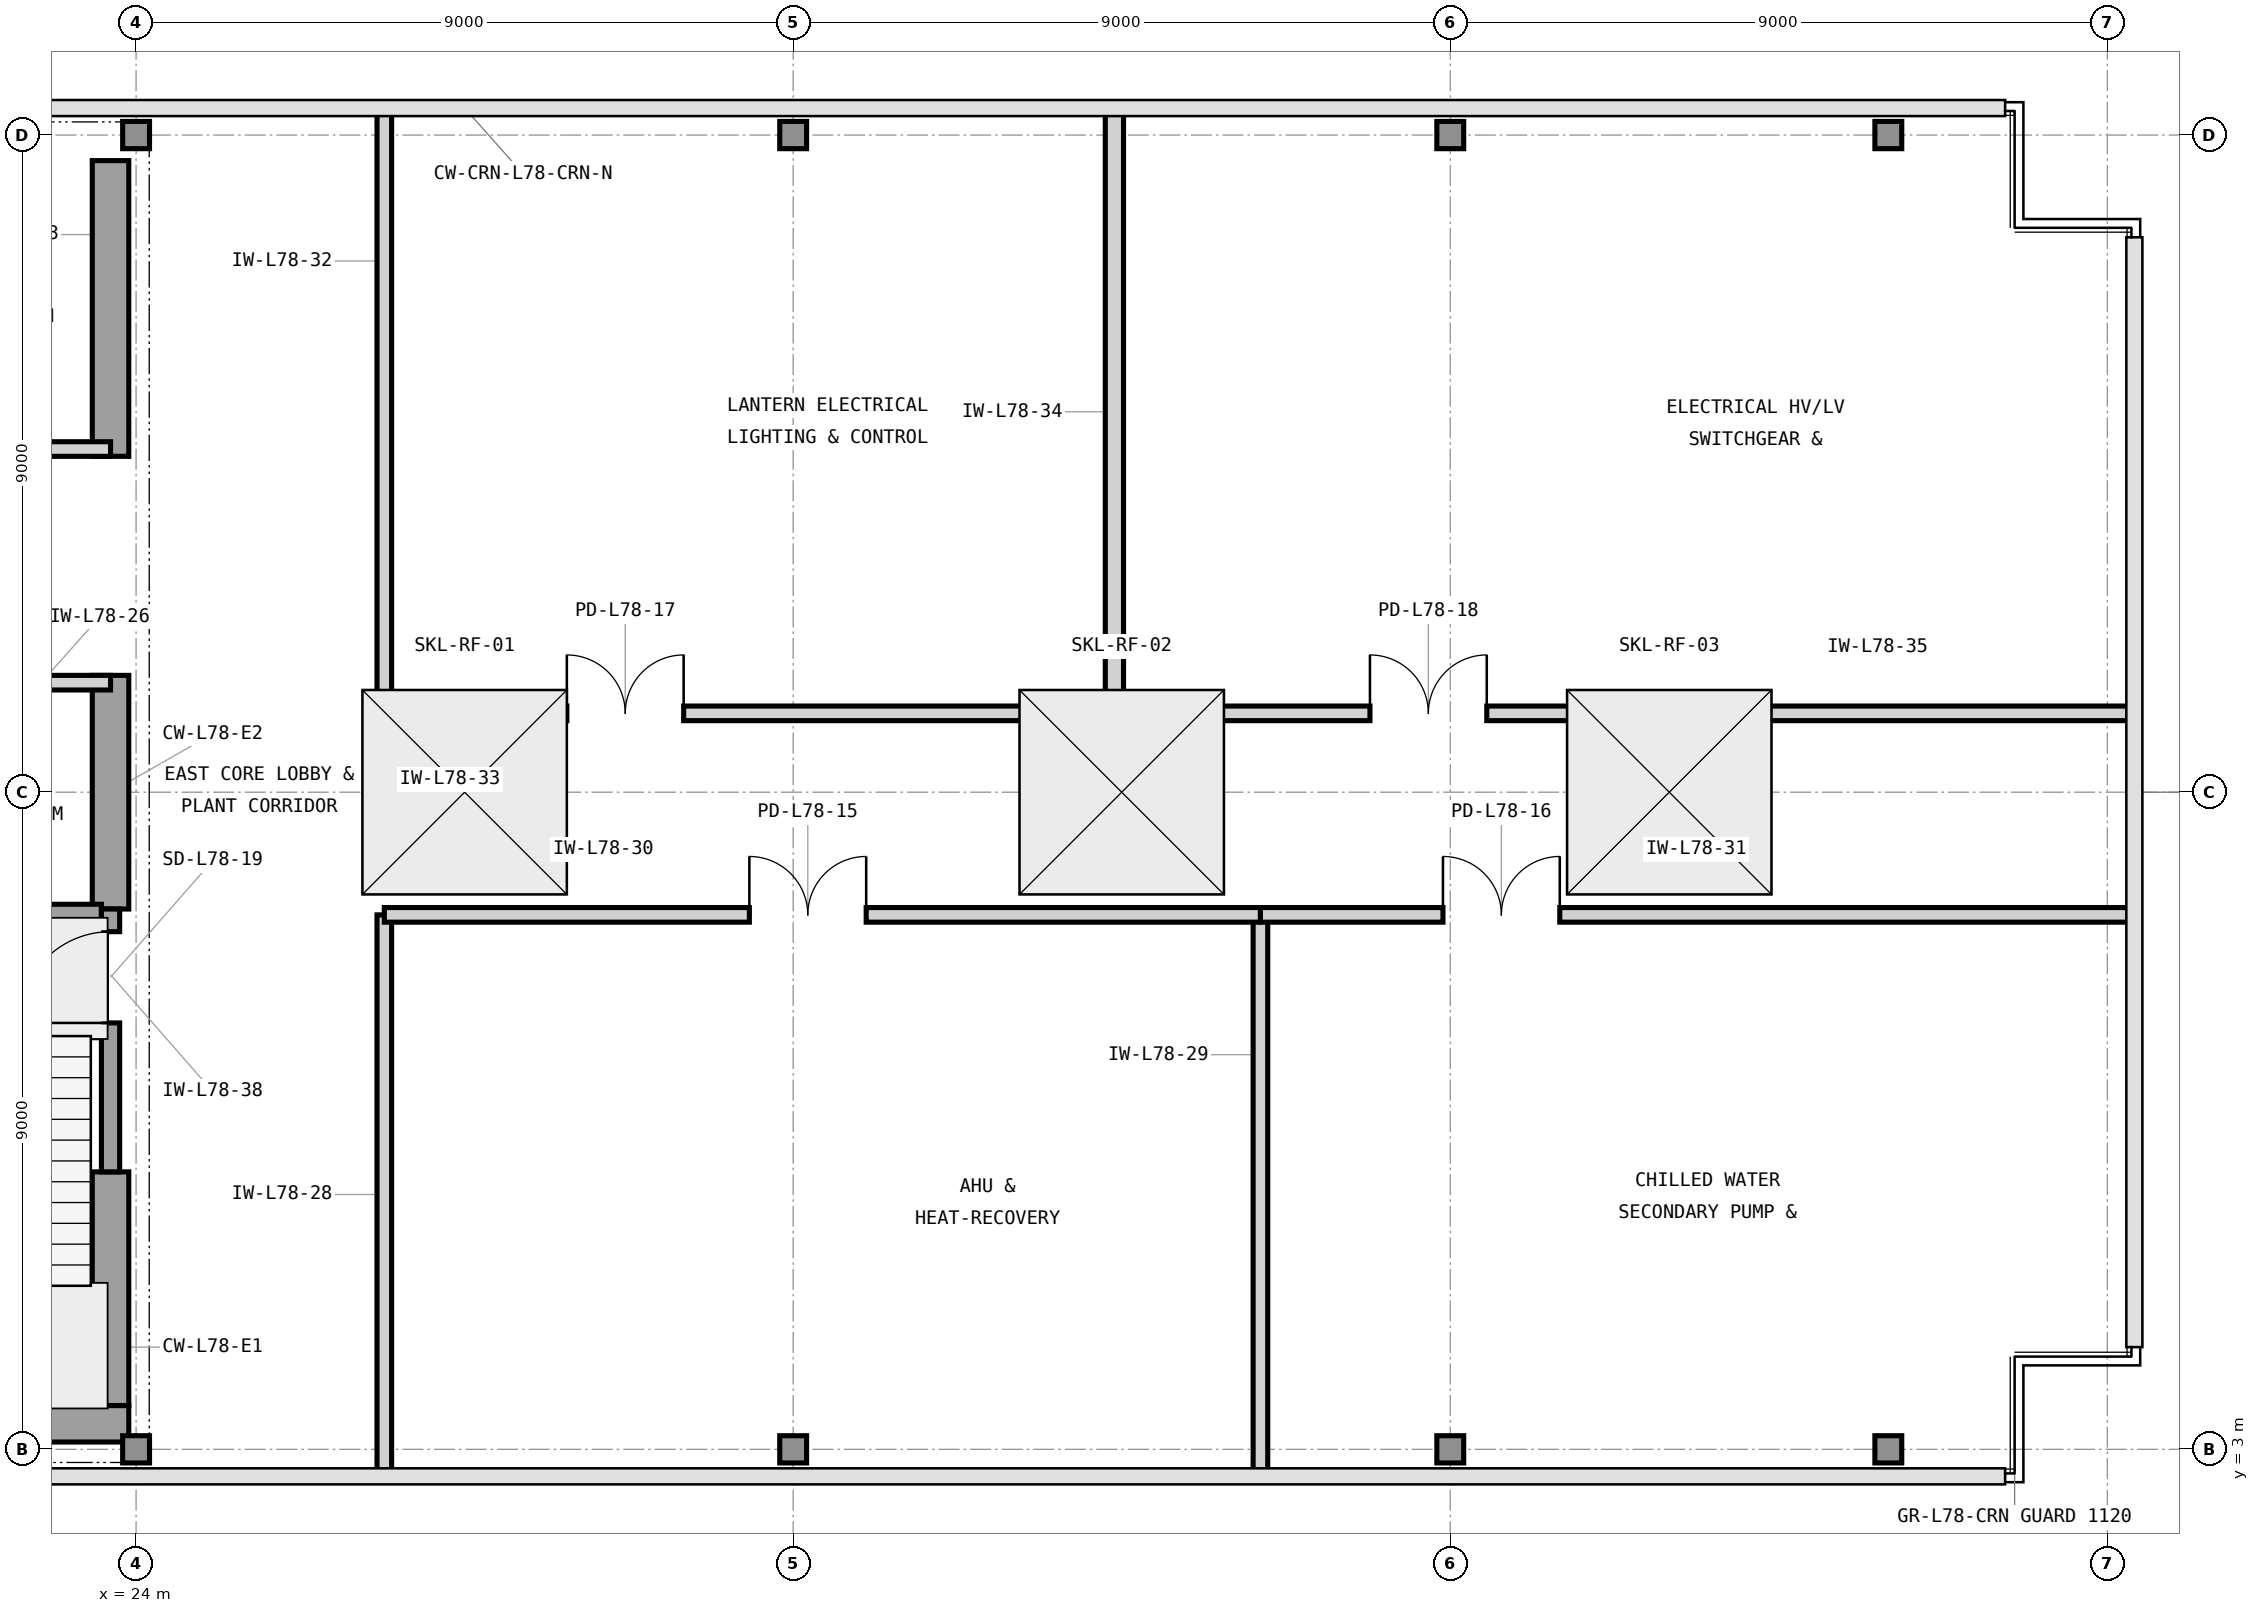
"""IFC4 building model, lengths in metres.
Left out: names, types, materials, properties, quantities, classifications, styles, units other than length and angle.
Written with IfcOpenShell. Run it as: python <this file> out.ifc"""

import sys

from ifc_helpers import new_model, si_unit, direction, frame, frame_2d, origin, origin_2d, place, context, subcontext, project, spatial, rectangle, i_section, extrude, element, fill, save


model = new_model("IFC4")
c1 = context("Model", 3, precision=1e-05, world=origin(), true_north=direction((0.0, 1.0)))
c2 = subcontext(c1, "Body", "Model", "MODEL_VIEW")
j1 = project(units=[si_unit("LENGTHUNIT", "METRE"), si_unit("PLANEANGLEUNIT", "RADIAN")], contexts=[c1])
p1 = place(None, origin())
s1 = spatial("IfcSite", under=j1, at=p1, CompositionType="ELEMENT")
p2 = place(p1, origin())
s2 = spatial("IfcBuilding", under=s1, at=p2, CompositionType="ELEMENT")
p3 = place(p2, frame((0.0, 0.0, 317.7)))
s3 = spatial("IfcBuildingStorey", under=s2, at=p3, CompositionType="ELEMENT", Elevation=317.7)
p4 = place(p3, frame((7.475, 3.35, 0.0), z_axis=(0.0, 0.0, 1.0), x_axis=(1.0, 0.0, 0.0)))
e1 = element("IfcWall", 1, at=p4, inside=s3, PredefinedType="SHEAR", context=c2, shape_type="SweptSolid", body=[
    extrude(rectangle(XDim=16.425, YDim=0.5, at=frame_2d((8.212, 0.0))), origin(), (0.0, 0.0, 1.0), 4.5),
])
p5 = place(p3, frame((23.65, 3.6, 0.0), z_axis=(0.0, 0.0, 1.0), x_axis=(0.0, 1.0, 0.0)))
e2 = element("IfcWall", 2, at=p5, inside=s3, PredefinedType="SHEAR", context=c2, shape_type="SweptSolid", body=[
    extrude(rectangle(XDim=3.2, YDim=0.5, at=frame_2d((1.6, 0.0))), origin(), (0.0, 0.0, 1.0), 4.5),
])
p6 = place(p3, frame((23.65, 10.4, 0.0), z_axis=(0.0, 0.0, 1.0), x_axis=(0.0, 1.0, 0.0)))
e3 = element("IfcWall", 3, at=p6, inside=s3, PredefinedType="SHEAR", context=c2, shape_type="SweptSolid", body=[
    extrude(rectangle(XDim=3.2, YDim=0.5, at=frame_2d((1.6, 0.0))), origin(), (0.0, 0.0, 1.0), 4.5),
])
p7 = place(p3, frame((23.65, 16.6, 0.0), z_axis=(0.0, 0.0, 1.0), x_axis=(0.0, 1.0, 0.0)))
e4 = element("IfcWall", 4, at=p7, inside=s3, PredefinedType="SHEAR", context=c2, shape_type="SweptSolid", body=[
    extrude(rectangle(XDim=4.05, YDim=0.5, at=frame_2d((2.025, 0.0))), origin(), (0.0, 0.0, 1.0), 4.5),
])
for number, where, z_axis, x_axis in (
    (5, (24.0, 3.0, 0.0), (0.0, 0.0, 1.0), (1.0, 0.0, 0.0)),
    (6, (24.0, 21.0, 0.0), (0.0, 0.0, 1.0), (1.0, 0.0, 0.0)),
    (7, (33.0, 3.0, 0.0), (0.0, 0.0, 1.0), (1.0, 0.0, 0.0)),
    (8, (33.0, 21.0, 0.0), (0.0, 0.0, 1.0), (1.0, 0.0, 0.0)),
    (9, (42.0, 3.0, 0.0), (0.0, 0.0, 1.0), (1.0, 0.0, 0.0)),
    (10, (42.0, 21.0, 0.0), (0.0, 0.0, 1.0), (1.0, 0.0, 0.0)),
    (11, (48.0, 3.0, 0.0), (0.0, 0.0, 1.0), (1.0, 0.0, 0.0)),
    (12, (48.0, 21.0, 0.0), (0.0, 0.0, 1.0), (1.0, 0.0, 0.0)),
):
    element("IfcColumn", number, at=place(p3, frame(where, z_axis=z_axis, x_axis=x_axis)), inside=s3, PredefinedType="COLUMN", context=c2, shape_type="SweptSolid", body=[
        extrude(i_section(OverallWidth=0.373, OverallDepth=0.368, WebThickness=0.015, FlangeThickness=0.024, FilletRadius=0.019, at=origin_2d()), origin(), (0.0, 0.0, 1.0), 4.5),
    ])
p8 = place(p3, frame((16.45, 16.7, 0.0), z_axis=(0.0, 0.0, 1.0), x_axis=(1.0, 0.0, 0.0)))
e13 = element("IfcWall", 13, at=p8, inside=s3, PredefinedType="PARTITIONING", context=c2, shape_type="SweptSolid", body=[
    extrude(rectangle(XDim=7.2, YDim=0.2, at=frame_2d((3.6, 0.0))), origin(), (0.0, 0.0, 1.0), 3.92),
])
p9 = place(p8, frame((2.2, 0.0, 0.0)))
e14 = element("IfcOpeningElement", 14, at=p9, cuts=e13, PredefinedType="OPENING", context=c2, shape_type="SweptSolid", body=[
    extrude(rectangle(XDim=1.6, YDim=2.3, at=frame_2d((0.8, 1.15))), frame((0.0, 0.11, 0.0), z_axis=(0.0, -1.0, 0.0), x_axis=(1.0, 0.0, 0.0)), (0.0, 0.0, 1.0), 0.22),
])
p10 = place(p3, frame((19.85, 13.5, 0.0), z_axis=(0.0, 0.0, 1.0), x_axis=(1.0, 0.0, 0.0)))
e15 = element("IfcWall", 15, at=p10, inside=s3, PredefinedType="PARTITIONING", context=c2, shape_type="SweptSolid", body=[
    extrude(rectangle(XDim=3.8, YDim=0.2, at=frame_2d((1.9, 0.0))), origin(), (0.0, 0.0, 1.0), 3.92),
])
p11 = place(p10, frame((1.425, 0.0, 0.0)))
e16 = element("IfcOpeningElement", 16, at=p11, cuts=e15, PredefinedType="OPENING", context=c2, shape_type="SweptSolid", body=[
    extrude(rectangle(XDim=0.95, YDim=2.1, at=frame_2d((0.475, 1.05))), frame((0.0, 0.11, 0.0), z_axis=(0.0, -1.0, 0.0), x_axis=(1.0, 0.0, 0.0)), (0.0, 0.0, 1.0), 0.22),
])
for number, where, z_axis, x_axis in (
    (17, (27.4, 2.66, 0.0), (0.0, 0.0, 1.0), (0.0, 1.0, 0.0)),
    (18, (39.4, 2.66, 0.0), (0.0, 0.0, 1.0), (0.0, 1.0, 0.0)),
):
    element("IfcWall", number, at=place(p3, frame(where, z_axis=z_axis, x_axis=x_axis)), inside=s3, PredefinedType="PARTITIONING", context=c2, shape_type="SweptSolid", body=[
        extrude(rectangle(XDim=7.66, YDim=0.2, at=frame_2d((3.83, 0.0))), origin(), (0.0, 0.0, 1.0), 4.23),
    ])
p12 = place(p3, frame((27.4, 10.32, 0.0), z_axis=(0.0, 0.0, 1.0), x_axis=(1.0, 0.0, 0.0)))
e19 = element("IfcWall", 19, at=p12, inside=s3, PredefinedType="PARTITIONING", context=c2, shape_type="SweptSolid", body=[
    extrude(rectangle(XDim=12.0, YDim=0.2, at=frame_2d((6.0, 0.0))), origin(), (0.0, 0.0, 1.0), 4.23),
])
p13 = place(p12, frame((5.0, 0.0, 0.0)))
e20 = element("IfcOpeningElement", 20, at=p13, cuts=e19, PredefinedType="OPENING", context=c2, shape_type="SweptSolid", body=[
    extrude(rectangle(XDim=1.6, YDim=2.3, at=frame_2d((0.8, 1.15))), frame((0.0, 0.11, 0.0), z_axis=(0.0, -1.0, 0.0), x_axis=(1.0, 0.0, 0.0)), (0.0, 0.0, 1.0), 0.22),
])
p14 = place(p3, frame((39.4, 10.32, 0.0), z_axis=(0.0, 0.0, 1.0), x_axis=(1.0, 0.0, 0.0)))
e21 = element("IfcWall", 21, at=p14, inside=s3, PredefinedType="PARTITIONING", context=c2, shape_type="SweptSolid", body=[
    extrude(rectangle(XDim=11.94, YDim=0.2, at=frame_2d((5.97, 0.0))), origin(), (0.0, 0.0, 1.0), 4.23),
])
p15 = place(p14, frame((2.5, 0.0, 0.0)))
e22 = element("IfcOpeningElement", 22, at=p15, cuts=e21, PredefinedType="OPENING", context=c2, shape_type="SweptSolid", body=[
    extrude(rectangle(XDim=1.6, YDim=2.3, at=frame_2d((0.8, 1.15))), frame((0.0, 0.11, 0.0), z_axis=(0.0, -1.0, 0.0), x_axis=(1.0, 0.0, 0.0)), (0.0, 0.0, 1.0), 0.22),
])
p16 = place(p3, frame((27.4, 13.08, 0.0), z_axis=(0.0, 0.0, 1.0), x_axis=(0.0, 1.0, 0.0)))
e23 = element("IfcWall", 23, at=p16, inside=s3, PredefinedType="PARTITIONING", context=c2, shape_type="SweptSolid", body=[
    extrude(rectangle(XDim=8.26, YDim=0.2, at=frame_2d((4.13, 0.0))), origin(), (0.0, 0.0, 1.0), 4.23),
])
p17 = place(p3, frame((27.4, 13.08, 0.0), z_axis=(0.0, 0.0, 1.0), x_axis=(1.0, 0.0, 0.0)))
e24 = element("IfcWall", 24, at=p17, inside=s3, PredefinedType="PARTITIONING", context=c2, shape_type="SweptSolid", body=[
    extrude(rectangle(XDim=10.0, YDim=0.2, at=frame_2d((5.0, 0.0))), origin(), (0.0, 0.0, 1.0), 4.23),
])
p18 = place(p17, frame((2.5, 0.0, 0.0)))
e25 = element("IfcOpeningElement", 25, at=p18, cuts=e24, PredefinedType="OPENING", context=c2, shape_type="SweptSolid", body=[
    extrude(rectangle(XDim=1.6, YDim=2.3, at=frame_2d((0.8, 1.15))), frame((0.0, 0.11, 0.0), z_axis=(0.0, -1.0, 0.0), x_axis=(1.0, 0.0, 0.0)), (0.0, 0.0, 1.0), 0.22),
])
p19 = place(p3, frame((37.4, 13.08, 0.0), z_axis=(0.0, 0.0, 1.0), x_axis=(0.0, 1.0, 0.0)))
e26 = element("IfcWall", 26, at=p19, inside=s3, PredefinedType="PARTITIONING", context=c2, shape_type="SweptSolid", body=[
    extrude(rectangle(XDim=8.26, YDim=0.25, at=frame_2d((4.13, 0.0))), origin(), (0.0, 0.0, 1.0), 4.23),
])
p20 = place(p3, frame((37.4, 13.08, 0.0), z_axis=(0.0, 0.0, 1.0), x_axis=(1.0, 0.0, 0.0)))
e27 = element("IfcWall", 27, at=p20, inside=s3, PredefinedType="PARTITIONING", context=c2, shape_type="SweptSolid", body=[
    extrude(rectangle(XDim=13.94, YDim=0.2, at=frame_2d((6.97, 0.0))), origin(), (0.0, 0.0, 1.0), 4.23),
])
p21 = place(p20, frame((3.5, 0.0, 0.0)))
e28 = element("IfcOpeningElement", 28, at=p21, cuts=e27, PredefinedType="OPENING", context=c2, shape_type="SweptSolid", body=[
    extrude(rectangle(XDim=1.6, YDim=2.3, at=frame_2d((0.8, 1.15))), frame((0.0, 0.11, 0.0), z_axis=(0.0, -1.0, 0.0), x_axis=(1.0, 0.0, 0.0)), (0.0, 0.0, 1.0), 0.22),
])
p22 = place(p3, frame((19.705, 10.34, 0.0), z_axis=(0.0, 0.0, 1.0), x_axis=(1.0, 0.0, 0.0)))
e29 = element("IfcWall", 29, at=p22, inside=s3, PredefinedType="SHEAR", context=c2, shape_type="SweptSolid", body=[
    extrude(rectangle(XDim=3.82, YDim=0.25, at=frame_2d((1.91, 0.0))), origin(), (0.0, 0.0, 1.0), 4.5),
])
p23 = place(p3, frame((23.65, 6.8, 0.0), z_axis=(0.0, 0.0, 1.0), x_axis=(0.0, 1.0, 0.0)))
e30 = element("IfcWall", 30, at=p23, inside=s3, PredefinedType="SHEAR", context=c2, shape_type="SweptSolid", body=[
    extrude(rectangle(XDim=3.6, YDim=0.25, at=frame_2d((1.8, 0.0))), origin(), (0.0, 0.0, 1.0), 4.5),
])
p24 = place(p23, frame((2.04, 0.0, 0.0)))
e31 = element("IfcOpeningElement", 31, at=p24, cuts=e30, PredefinedType="OPENING", context=c2, shape_type="SweptSolid", body=[
    extrude(rectangle(XDim=1.25, YDim=2.2, at=frame_2d((0.625, 1.1))), frame((0.0, 0.135, 0.0), z_axis=(0.0, -1.0, 0.0), x_axis=(1.0, 0.0, 0.0)), (0.0, 0.0, 1.0), 0.27),
])
p25 = place(p2, frame((0.0, 0.0, 322.2)))
p26 = place(p25, frame((0.0, 0.0, -0.26)))
p27 = place(p26, frame((28.5, 12.0, 0.0)))
p28 = place(p27, frame((0.0, 0.0, 0.21)))
e32 = element("IfcWindow", 32, at=p28, inside=s3, PartitioningType="SINGLE_PANEL", PredefinedType="SKYLIGHT", context=c2, shape_type="SweptSolid", body=[
    extrude(rectangle(XDim=2.8, YDim=2.8, at=origin_2d()), origin(), (0.0, 0.0, 1.0), 0.05),
])
p29 = place(p26, frame((37.5, 12.0, 0.0)))
p30 = place(p29, frame((0.0, 0.0, 0.21)))
e33 = element("IfcWindow", 33, at=p30, inside=s3, PartitioningType="SINGLE_PANEL", PredefinedType="SKYLIGHT", context=c2, shape_type="SweptSolid", body=[
    extrude(rectangle(XDim=2.8, YDim=2.8, at=origin_2d()), origin(), (0.0, 0.0, 1.0), 0.05),
])
p31 = place(p26, frame((45.0, 12.0, 0.0)))
p32 = place(p31, frame((0.0, 0.0, 0.21)))
e34 = element("IfcWindow", 34, at=p32, inside=s3, PartitioningType="SINGLE_PANEL", PredefinedType="SKYLIGHT", context=c2, shape_type="SweptSolid", body=[
    extrude(rectangle(XDim=2.8, YDim=2.8, at=origin_2d()), origin(), (0.0, 0.0, 1.0), 0.05),
])
p33 = place(p13, origin())
e35 = element("IfcDoor", 35, at=p33, inside=s3, OperationType="DOUBLE_DOOR_SINGLE_SWING", PredefinedType="DOOR", context=c2, shape_type="SweptSolid", body=[
    extrude(rectangle(XDim=1.6, YDim=2.3, at=frame_2d((0.8, 1.15))), frame((0.0, 0.025, 0.0), z_axis=(0.0, -1.0, 0.0), x_axis=(1.0, 0.0, 0.0)), (0.0, 0.0, 1.0), 0.05),
])
fill(e20, e35)
p34 = place(p15, origin())
e36 = element("IfcDoor", 36, at=p34, inside=s3, OperationType="DOUBLE_DOOR_SINGLE_SWING", PredefinedType="DOOR", context=c2, shape_type="SweptSolid", body=[
    extrude(rectangle(XDim=1.6, YDim=2.3, at=frame_2d((0.8, 1.15))), frame((0.0, 0.025, 0.0), z_axis=(0.0, -1.0, 0.0), x_axis=(1.0, 0.0, 0.0)), (0.0, 0.0, 1.0), 0.05),
])
fill(e22, e36)
p35 = place(p18, origin())
e37 = element("IfcDoor", 37, at=p35, inside=s3, OperationType="DOUBLE_DOOR_SINGLE_SWING", PredefinedType="DOOR", context=c2, shape_type="SweptSolid", body=[
    extrude(rectangle(XDim=1.6, YDim=2.3, at=frame_2d((0.8, 1.15))), frame((0.0, 0.025, 0.0), z_axis=(0.0, -1.0, 0.0), x_axis=(1.0, 0.0, 0.0)), (0.0, 0.0, 1.0), 0.05),
])
fill(e25, e37)
p36 = place(p21, origin())
e38 = element("IfcDoor", 38, at=p36, inside=s3, OperationType="DOUBLE_DOOR_SINGLE_SWING", PredefinedType="DOOR", context=c2, shape_type="SweptSolid", body=[
    extrude(rectangle(XDim=1.6, YDim=2.3, at=frame_2d((0.8, 1.15))), frame((0.0, 0.025, 0.0), z_axis=(0.0, -1.0, 0.0), x_axis=(1.0, 0.0, 0.0)), (0.0, 0.0, 1.0), 0.05),
])
fill(e28, e38)
p37 = place(p24, origin())
e39 = element("IfcDoor", 39, at=p37, inside=s3, OperationType="SINGLE_SWING_LEFT", PredefinedType="DOOR", context=c2, shape_type="SweptSolid", body=[
    extrude(rectangle(XDim=1.25, YDim=2.2, at=frame_2d((0.625, 1.1))), frame((0.0, 0.025, 0.0), z_axis=(0.0, -1.0, 0.0), x_axis=(1.0, 0.0, 0.0)), (0.0, 0.0, 1.0), 0.05),
])
fill(e31, e39)
save(model, sys.argv[1])
